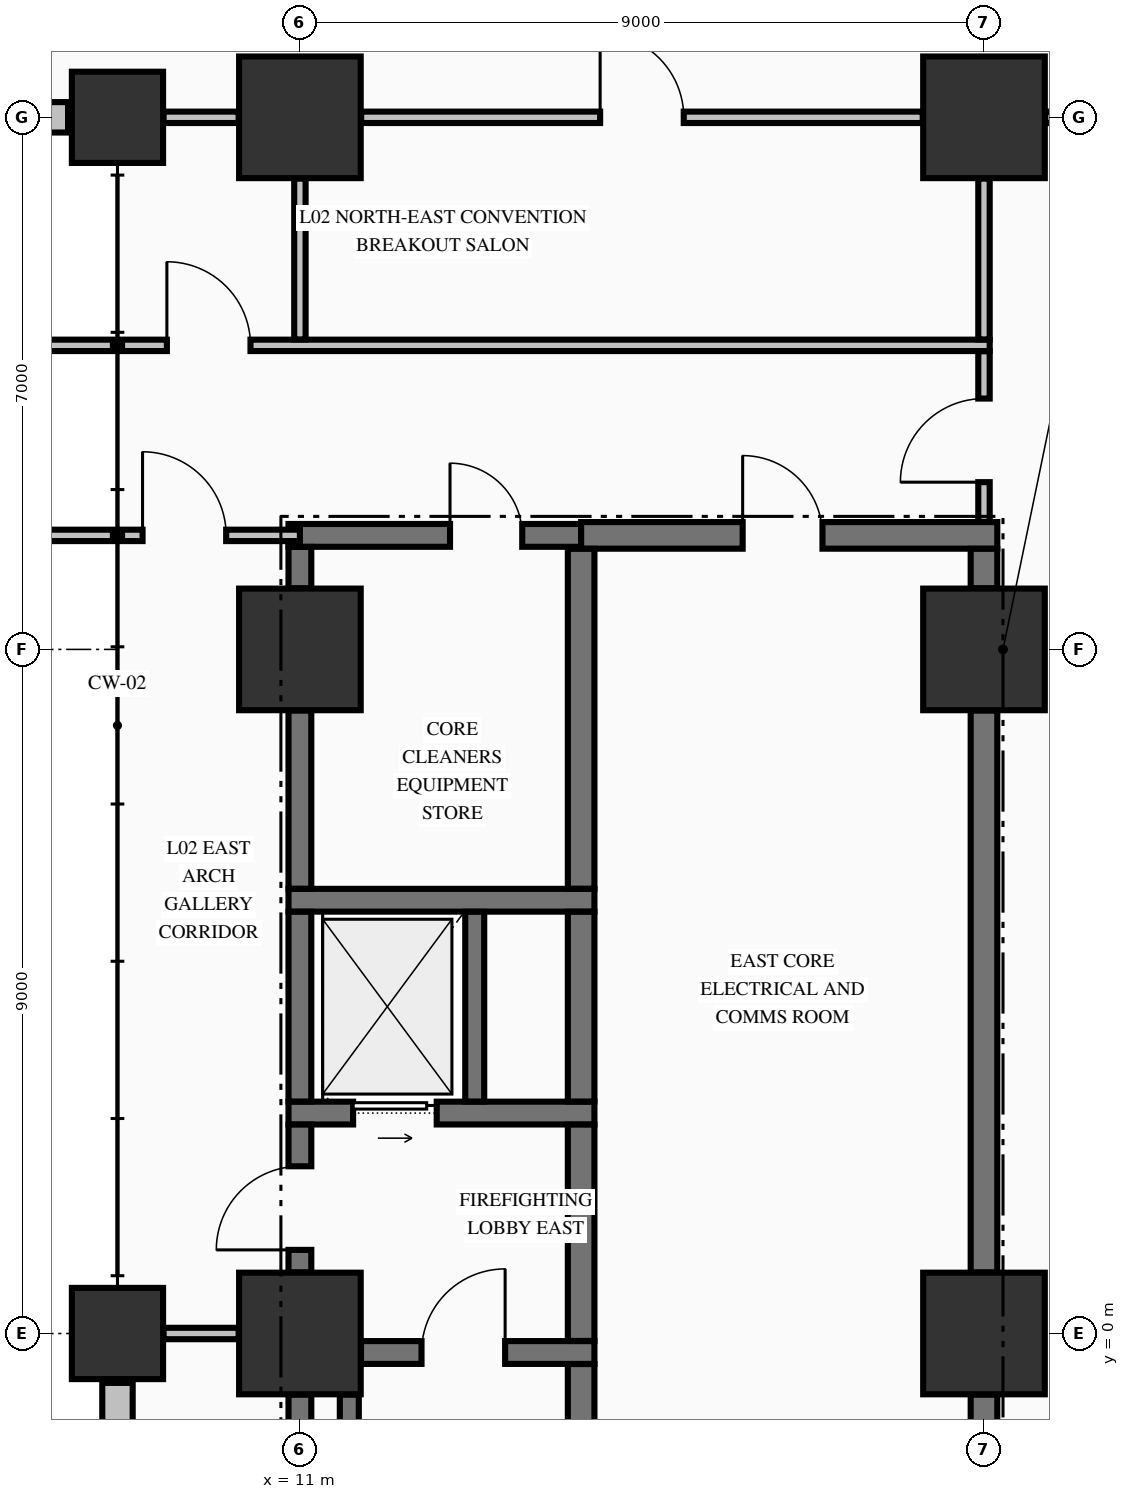
"""IFC4 building model, lengths in metres.
Left out: names, types, materials, properties, quantities, classifications, styles, units other than length and angle.
Written with IfcOpenShell. Run it as: python <this file> out.ifc"""

import sys

from ifc_helpers import new_model, si_unit, direction, frame, frame_2d, origin, origin_2d, place, context, subcontext, project, spatial, rectangle, extrude, element, fill, save


model = new_model("IFC4")
c1 = context("Model", 3, precision=1e-05, world=origin(), true_north=direction((0.0, 1.0)))
c2 = subcontext(c1, "Body", "Model", "MODEL_VIEW")
j1 = project(units=[si_unit("LENGTHUNIT", "METRE"), si_unit("PLANEANGLEUNIT", "RADIAN")], contexts=[c1])
p1 = place(None, origin())
s1 = spatial("IfcSite", under=j1, at=p1, CompositionType="ELEMENT")
p2 = place(p1, origin())
s2 = spatial("IfcBuilding", under=s1, at=p2, CompositionType="ELEMENT")
p3 = place(p2, frame((0.0, 0.0, 10.88)))
s3 = spatial("IfcBuildingStorey", under=s2, at=p3, CompositionType="ELEMENT", Elevation=10.88)
for number, where, z_axis, x_axis in (
    (1, (11.0, 0.0, 0.0), (0.0, 0.0, 1.0), (1.0, 0.0, 0.0)),
    (2, (11.0, 9.0, 0.0), (0.0, 0.0, 1.0), (1.0, 0.0, 0.0)),
    (3, (11.0, 16.0, 0.0), (0.0, 0.0, 1.0), (1.0, 0.0, 0.0)),
    (4, (20.0, 0.0, 0.0), (0.0, 0.0, 1.0), (1.0, 0.0, 0.0)),
    (5, (20.0, 9.0, 0.0), (0.0, 0.0, 1.0), (1.0, 0.0, 0.0)),
    (6, (20.0, 16.0, 0.0), (0.0, 0.0, 1.0), (1.0, 0.0, 0.0)),
):
    element("IfcColumn", number, at=place(p3, frame(where, z_axis=z_axis, x_axis=x_axis)), inside=s3, PredefinedType="COLUMN", context=c2, shape_type="SweptSolid", body=[
        extrude(rectangle(XDim=1.6, YDim=1.6, at=origin_2d()), origin(), (0.0, 0.0, 1.0), 5.09),
    ])
for number, where, z_axis, x_axis in (
    (7, (8.6, 0.0, 0.0), (0.0, 0.0, 1.0), (1.0, 0.0, 0.0)),
    (8, (8.6, 16.0, 0.0), (0.0, 0.0, 1.0), (1.0, 0.0, 0.0)),
):
    element("IfcColumn", number, at=place(p3, frame(where, z_axis=z_axis, x_axis=x_axis)), inside=s3, PredefinedType="COLUMN", context=c2, shape_type="SweptSolid", body=[
        extrude(rectangle(XDim=1.2, YDim=1.2, at=origin_2d()), origin(), (0.0, 0.0, 1.0), 5.09),
    ])
p4 = place(p3, frame((8.6, -0.65, 0.0), z_axis=(0.0, 0.0, 1.0), x_axis=(0.0, -1.0, 0.0)))
e9 = element("IfcWall", 9, at=p4, inside=s3, PredefinedType="STANDARD", context=c2, shape_type="SweptSolid", body=[
    extrude(rectangle(XDim=24.72, YDim=0.4, at=frame_2d((12.36, 0.0))), origin(), (0.0, 0.0, 1.0), 4.132),
])
p5 = place(p3, frame((0.73, 16.0, 0.0), z_axis=(0.0, 0.0, 1.0), x_axis=(1.0, 0.0, 0.0)))
e10 = element("IfcWall", 10, at=p5, inside=s3, PredefinedType="STANDARD", context=c2, shape_type="SweptSolid", body=[
    extrude(rectangle(XDim=7.22, YDim=0.4, at=frame_2d((3.61, 0.0))), origin(), (0.0, 0.0, 1.0), 4.132),
])
p6 = place(p3, frame((11.804, -0.25, 0.0), z_axis=(0.0, 0.0, 1.0), x_axis=(1.0, 0.0, 0.0)))
e11 = element("IfcWall", 11, at=p6, inside=s3, PredefinedType="SHEAR", context=c2, shape_type="SweptSolid", body=[
    extrude(rectangle(XDim=3.071, YDim=0.3, at=frame_2d((1.536, 0.0))), origin(), (0.0, 0.0, 1.0), 5.09),
])
p7 = place(p6, frame((0.796, 0.0, 0.0)))
e12 = element("IfcOpeningElement", 12, at=p7, cuts=e11, PredefinedType="OPENING", context=c2, shape_type="SweptSolid", body=[
    extrude(rectangle(XDim=1.1, YDim=2.15, at=frame_2d((0.55, 1.075))), frame((0.0, 0.16, 0.0), z_axis=(0.0, -1.0, 0.0), x_axis=(1.0, 0.0, 0.0)), (0.0, 0.0, 1.0), 0.32),
])
p8 = place(p3, frame((10.85, 2.9, 0.0), z_axis=(0.0, 0.0, 1.0), x_axis=(1.0, 0.0, 0.0)))
e13 = element("IfcWall", 13, at=p8, inside=s3, PredefinedType="SHEAR", context=c2, shape_type="SweptSolid", body=[
    extrude(rectangle(XDim=4.025, YDim=0.3, at=frame_2d((2.012, 0.0))), origin(), (0.0, 0.0, 1.0), 5.09),
])
p9 = place(p8, frame((0.85, 0.0, 0.0)))
e14 = element("IfcOpeningElement", 14, at=p9, cuts=e13, PredefinedType="OPENING", context=c2, shape_type="SweptSolid", body=[
    extrude(rectangle(XDim=1.1, YDim=2.2, at=frame_2d((0.55, 1.1))), frame((0.0, 0.16, 0.0), z_axis=(0.0, -1.0, 0.0), x_axis=(1.0, 0.0, 0.0)), (0.0, 0.0, 1.0), 0.32),
])
p10 = place(p3, frame((10.85, 5.7, 0.0), z_axis=(0.0, 0.0, 1.0), x_axis=(1.0, 0.0, 0.0)))
e15 = element("IfcWall", 15, at=p10, inside=s3, PredefinedType="SHEAR", context=c2, shape_type="SweptSolid", body=[
    extrude(rectangle(XDim=4.025, YDim=0.3, at=frame_2d((2.012, 0.0))), origin(), (0.0, 0.0, 1.0), 5.09),
])
p11 = place(p3, frame((10.85, 10.5, 0.0), z_axis=(0.0, 0.0, 1.0), x_axis=(1.0, 0.0, 0.0)))
e16 = element("IfcWall", 16, at=p11, inside=s3, PredefinedType="SHEAR", context=c2, shape_type="SweptSolid", body=[
    extrude(rectangle(XDim=3.85, YDim=0.3, at=frame_2d((1.925, 0.0))), origin(), (0.0, 0.0, 1.0), 5.09),
])
p12 = place(p11, frame((2.125, 0.0, 0.0)))
e17 = element("IfcOpeningElement", 17, at=p12, cuts=e16, PredefinedType="OPENING", context=c2, shape_type="SweptSolid", body=[
    extrude(rectangle(XDim=0.95, YDim=2.15, at=frame_2d((0.475, 1.075))), frame((0.0, 0.16, 0.0), z_axis=(0.0, -1.0, 0.0), x_axis=(1.0, 0.0, 0.0)), (0.0, 0.0, 1.0), 0.32),
])
p13 = place(p3, frame((14.7, 10.5, 0.0), z_axis=(0.0, 0.0, 1.0), x_axis=(1.0, 0.0, 0.0)))
e18 = element("IfcWall", 18, at=p13, inside=s3, PredefinedType="SHEAR", context=c2, shape_type="SweptSolid", body=[
    extrude(rectangle(XDim=5.475, YDim=0.35, at=frame_2d((2.738, 0.0))), origin(), (0.0, 0.0, 1.0), 5.09),
])
p14 = place(p13, frame((2.125, 0.0, 0.0)))
e19 = element("IfcOpeningElement", 19, at=p14, cuts=e18, PredefinedType="OPENING", context=c2, shape_type="SweptSolid", body=[
    extrude(rectangle(XDim=1.05, YDim=2.15, at=frame_2d((0.525, 1.075))), frame((0.0, 0.185, 0.0), z_axis=(0.0, -1.0, 0.0), x_axis=(1.0, 0.0, 0.0)), (0.0, 0.0, 1.0), 0.37),
])
p15 = place(p3, frame((9.206, 0.0, 0.0), z_axis=(0.0, 0.0, 1.0), x_axis=(1.0, 0.0, 0.0)))
e20 = element("IfcWall", 20, at=p15, inside=s3, PredefinedType="PARTITIONING", context=c2, shape_type="SweptSolid", body=[
    extrude(rectangle(XDim=0.988, YDim=0.15, at=frame_2d((0.494, 0.0))), origin(), (0.0, 0.0, 1.0), 4.132),
])
p16 = place(p3, frame((-8.54, 10.5, 0.0), z_axis=(0.0, 0.0, 1.0), x_axis=(1.0, 0.0, 0.0)))
e21 = element("IfcWall", 21, at=p16, inside=s3, PredefinedType="PARTITIONING", context=c2, shape_type="SweptSolid", body=[
    extrude(rectangle(XDim=17.08, YDim=0.15, at=frame_2d((8.54, 0.0))), origin(), (0.0, 0.0, 1.0), 5.09),
])
p17 = place(p3, frame((8.66, 10.5, 0.0), z_axis=(0.0, 0.0, 1.0), x_axis=(1.0, 0.0, 0.0)))
e22 = element("IfcWall", 22, at=p17, inside=s3, PredefinedType="PARTITIONING", context=c2, shape_type="SweptSolid", body=[
    extrude(rectangle(XDim=2.34, YDim=0.15, at=frame_2d((1.17, 0.0))), origin(), (0.0, 0.0, 1.0), 5.09),
])
p18 = place(p17, frame((0.27, 0.0, 0.0)))
e23 = element("IfcOpeningElement", 23, at=p18, cuts=e22, PredefinedType="OPENING", context=c2, shape_type="SweptSolid", body=[
    extrude(rectangle(XDim=1.1, YDim=2.15, at=frame_2d((0.55, 1.075))), frame((0.0, 0.085, 0.0), z_axis=(0.0, -1.0, 0.0), x_axis=(1.0, 0.0, 0.0)), (0.0, 0.0, 1.0), 0.17),
])
p19 = place(p3, frame((-8.54, 13.0, 0.0), z_axis=(0.0, 0.0, 1.0), x_axis=(1.0, 0.0, 0.0)))
e24 = element("IfcWall", 24, at=p19, inside=s3, PredefinedType="PARTITIONING", context=c2, shape_type="SweptSolid", body=[
    extrude(rectangle(XDim=17.08, YDim=0.15, at=frame_2d((8.54, 0.0))), origin(), (0.0, 0.0, 1.0), 5.09),
])
p20 = place(p3, frame((8.66, 13.0, 0.0), z_axis=(0.0, 0.0, 1.0), x_axis=(1.0, 0.0, 0.0)))
e25 = element("IfcWall", 25, at=p20, inside=s3, PredefinedType="PARTITIONING", context=c2, shape_type="SweptSolid", body=[
    extrude(rectangle(XDim=11.415, YDim=0.15, at=frame_2d((5.708, 0.0))), origin(), (0.0, 0.0, 1.0), 5.09),
])
p21 = place(p20, frame((0.59, 0.0, 0.0)))
e26 = element("IfcOpeningElement", 26, at=p21, cuts=e25, PredefinedType="OPENING", context=c2, shape_type="SweptSolid", body=[
    extrude(rectangle(XDim=1.1, YDim=2.15, at=frame_2d((0.55, 1.075))), frame((0.0, 0.085, 0.0), z_axis=(0.0, -1.0, 0.0), x_axis=(1.0, 0.0, 0.0)), (0.0, 0.0, 1.0), 0.17),
])
p22 = place(p3, frame((9.206, 16.0, 0.0), z_axis=(0.0, 0.0, 1.0), x_axis=(1.0, 0.0, 0.0)))
e27 = element("IfcWall", 27, at=p22, inside=s3, PredefinedType="PARTITIONING", context=c2, shape_type="SweptSolid", body=[
    extrude(rectangle(XDim=0.988, YDim=0.15, at=frame_2d((0.494, 0.0))), origin(), (0.0, 0.0, 1.0), 4.132),
])
p23 = place(p3, frame((11.806, 16.0, 0.0), z_axis=(0.0, 0.0, 1.0), x_axis=(1.0, 0.0, 0.0)))
e28 = element("IfcWall", 28, at=p23, inside=s3, PredefinedType="PARTITIONING", context=c2, shape_type="SweptSolid", body=[
    extrude(rectangle(XDim=7.388, YDim=0.15, at=frame_2d((3.694, 0.0))), origin(), (0.0, 0.0, 1.0), 4.132),
])
p24 = place(p23, frame((3.144, 0.0, 0.0)))
e29 = element("IfcOpeningElement", 29, at=p24, cuts=e28, PredefinedType="OPENING", context=c2, shape_type="SweptSolid", body=[
    extrude(rectangle(XDim=1.1, YDim=2.15, at=frame_2d((0.55, 1.075))), frame((0.0, 0.085, 0.0), z_axis=(0.0, -1.0, 0.0), x_axis=(1.0, 0.0, 0.0)), (0.0, 0.0, 1.0), 0.17),
])
p25 = place(p3, frame((20.806, 16.0, 0.0), z_axis=(0.0, 0.0, 1.0), x_axis=(1.0, 0.0, 0.0)))
e30 = element("IfcWall", 30, at=p25, inside=s3, PredefinedType="PARTITIONING", context=c2, shape_type="SweptSolid", body=[
    extrude(rectangle(XDim=4.488, YDim=0.15, at=frame_2d((2.244, 0.0))), origin(), (0.0, 0.0, 1.0), 4.132),
])
p26 = place(p25, frame((0.15, 0.0, 0.0)))
e31 = element("IfcOpeningElement", 31, at=p26, cuts=e30, PredefinedType="OPENING", context=c2, shape_type="SweptSolid", body=[
    extrude(rectangle(XDim=1.1, YDim=2.15, at=frame_2d((0.55, 1.075))), frame((0.0, 0.085, 0.0), z_axis=(0.0, -1.0, 0.0), x_axis=(1.0, 0.0, 0.0)), (0.0, 0.0, 1.0), 0.17),
])
p27 = place(p25, frame((2.844, 0.0, 0.0)))
e32 = element("IfcOpeningElement", 32, at=p27, cuts=e30, PredefinedType="OPENING", context=c2, shape_type="SweptSolid", body=[
    extrude(rectangle(XDim=1.1, YDim=2.15, at=frame_2d((0.55, 1.075))), frame((0.0, 0.085, 0.0), z_axis=(0.0, -1.0, 0.0), x_axis=(1.0, 0.0, 0.0)), (0.0, 0.0, 1.0), 0.17),
])
p28 = place(p3, frame((11.0, -8.196, 0.0), z_axis=(0.0, 0.0, 1.0), x_axis=(0.0, 1.0, 0.0)))
e33 = element("IfcWall", 33, at=p28, inside=s3, PredefinedType="SHEAR", context=c2, shape_type="SweptSolid", body=[
    extrude(rectangle(XDim=7.392, YDim=0.3, at=frame_2d((3.696, 0.0))), origin(), (0.0, 0.0, 1.0), 5.09),
])
p29 = place(p3, frame((11.0, 0.804, 0.0), z_axis=(0.0, 0.0, 1.0), x_axis=(0.0, 1.0, 0.0)))
e34 = element("IfcWall", 34, at=p29, inside=s3, PredefinedType="SHEAR", context=c2, shape_type="SweptSolid", body=[
    extrude(rectangle(XDim=1.944, YDim=0.3, at=frame_2d((0.972, 0.0))), origin(), (0.0, 0.0, 1.0), 5.09),
])
p30 = place(p29, frame((0.296, 0.0, 0.0)))
e35 = element("IfcOpeningElement", 35, at=p30, cuts=e34, PredefinedType="OPENING", context=c2, shape_type="SweptSolid", body=[
    extrude(rectangle(XDim=1.1, YDim=2.15, at=frame_2d((0.55, 1.075))), frame((0.0, 0.16, 0.0), z_axis=(0.0, -1.0, 0.0), x_axis=(1.0, 0.0, 0.0)), (0.0, 0.0, 1.0), 0.32),
])
p31 = place(p3, frame((11.0, 3.052, 0.0), z_axis=(0.0, 0.0, 1.0), x_axis=(0.0, 1.0, 0.0)))
e36 = element("IfcWall", 36, at=p31, inside=s3, PredefinedType="SHEAR", context=c2, shape_type="SweptSolid", body=[
    extrude(rectangle(XDim=2.496, YDim=0.3, at=frame_2d((1.248, 0.0))), origin(), (0.0, 0.0, 1.0), 5.09),
])
p32 = place(p3, frame((11.0, 5.852, 0.0), z_axis=(0.0, 0.0, 1.0), x_axis=(0.0, 1.0, 0.0)))
e37 = element("IfcWall", 37, at=p32, inside=s3, PredefinedType="SHEAR", context=c2, shape_type="SweptSolid", body=[
    extrude(rectangle(XDim=2.344, YDim=0.3, at=frame_2d((1.172, 0.0))), origin(), (0.0, 0.0, 1.0), 5.09),
])
p33 = place(p3, frame((11.0, 9.804, 0.0), z_axis=(0.0, 0.0, 1.0), x_axis=(0.0, 1.0, 0.0)))
e38 = element("IfcWall", 38, at=p33, inside=s3, PredefinedType="SHEAR", context=c2, shape_type="SweptSolid", body=[
    extrude(rectangle(XDim=0.544, YDim=0.3, at=frame_2d((0.272, 0.0))), origin(), (0.0, 0.0, 1.0), 5.09),
])
p34 = place(p3, frame((11.65, -8.196, 0.0), z_axis=(0.0, 0.0, 1.0), x_axis=(0.0, 1.0, 0.0)))
e39 = element("IfcWall", 39, at=p34, inside=s3, PredefinedType="SOLIDWALL", context=c2, shape_type="SweptSolid", body=[
    extrude(rectangle(XDim=7.392, YDim=0.25, at=frame_2d((3.696, 0.0))), origin(), (0.0, 0.0, 1.0), 5.09),
])
p35 = place(p3, frame((13.3, 3.052, 0.0), z_axis=(0.0, 0.0, 1.0), x_axis=(0.0, 1.0, 0.0)))
e40 = element("IfcWall", 40, at=p35, inside=s3, PredefinedType="SOLIDWALL", context=c2, shape_type="SweptSolid", body=[
    extrude(rectangle(XDim=2.496, YDim=0.25, at=frame_2d((1.248, 0.0))), origin(), (0.0, 0.0, 1.0), 5.09),
])
p36 = place(p3, frame((14.7, -9.773, 0.0), z_axis=(0.0, 0.0, 1.0), x_axis=(0.0, 1.0, 0.0)))
e41 = element("IfcWall", 41, at=p36, inside=s3, PredefinedType="SHEAR", context=c2, shape_type="SweptSolid", body=[
    extrude(rectangle(XDim=9.371, YDim=0.35, at=frame_2d((4.686, 0.0))), origin(), (0.0, 0.0, 1.0), 5.09),
])
p37 = place(p3, frame((14.7, -0.098, 0.0), z_axis=(0.0, 0.0, 1.0), x_axis=(0.0, 1.0, 0.0)))
e42 = element("IfcWall", 42, at=p37, inside=s3, PredefinedType="SHEAR", context=c2, shape_type="SweptSolid", body=[
    extrude(rectangle(XDim=2.846, YDim=0.35, at=frame_2d((1.423, 0.0))), origin(), (0.0, 0.0, 1.0), 5.09),
])
p38 = place(p3, frame((14.7, 3.052, 0.0), z_axis=(0.0, 0.0, 1.0), x_axis=(0.0, 1.0, 0.0)))
e43 = element("IfcWall", 43, at=p38, inside=s3, PredefinedType="SHEAR", context=c2, shape_type="SweptSolid", body=[
    extrude(rectangle(XDim=2.496, YDim=0.35, at=frame_2d((1.248, 0.0))), origin(), (0.0, 0.0, 1.0), 5.09),
])
p39 = place(p3, frame((14.7, 5.852, 0.0), z_axis=(0.0, 0.0, 1.0), x_axis=(0.0, 1.0, 0.0)))
e44 = element("IfcWall", 44, at=p39, inside=s3, PredefinedType="SHEAR", context=c2, shape_type="SweptSolid", body=[
    extrude(rectangle(XDim=4.471, YDim=0.35, at=frame_2d((2.235, 0.0))), origin(), (0.0, 0.0, 1.0), 5.09),
])
p40 = place(p3, frame((20.0, -4.423, 0.0), z_axis=(0.0, 0.0, 1.0), x_axis=(0.0, 1.0, 0.0)))
e45 = element("IfcWall", 45, at=p40, inside=s3, PredefinedType="SHEAR", context=c2, shape_type="SweptSolid", body=[
    extrude(rectangle(XDim=3.619, YDim=0.35, at=frame_2d((1.81, 0.0))), origin(), (0.0, 0.0, 1.0), 5.09),
])
p41 = place(p3, frame((20.0, 0.804, 0.0), z_axis=(0.0, 0.0, 1.0), x_axis=(0.0, 1.0, 0.0)))
e46 = element("IfcWall", 46, at=p41, inside=s3, PredefinedType="SHEAR", context=c2, shape_type="SweptSolid", body=[
    extrude(rectangle(XDim=7.392, YDim=0.35, at=frame_2d((3.696, 0.0))), origin(), (0.0, 0.0, 1.0), 5.09),
])
p42 = place(p3, frame((20.0, 9.804, 0.0), z_axis=(0.0, 0.0, 1.0), x_axis=(0.0, 1.0, 0.0)))
e47 = element("IfcWall", 47, at=p42, inside=s3, PredefinedType="SHEAR", context=c2, shape_type="SweptSolid", body=[
    extrude(rectangle(XDim=0.519, YDim=0.35, at=frame_2d((0.26, 0.0))), origin(), (0.0, 0.0, 1.0), 5.09),
])
p43 = place(p3, frame((11.0, 13.078, 0.0), z_axis=(0.0, 0.0, 1.0), x_axis=(0.0, 1.0, 0.0)))
e48 = element("IfcWall", 48, at=p43, inside=s3, PredefinedType="PARTITIONING", context=c2, shape_type="SweptSolid", body=[
    extrude(rectangle(XDim=2.116, YDim=0.15, at=frame_2d((1.058, 0.0))), origin(), (0.0, 0.0, 1.0), 4.132),
])
p44 = place(p3, frame((20.0, 10.678, 0.0), z_axis=(0.0, 0.0, 1.0), x_axis=(0.0, 1.0, 0.0)))
e49 = element("IfcWall", 49, at=p44, inside=s3, PredefinedType="PARTITIONING", context=c2, shape_type="SweptSolid", body=[
    extrude(rectangle(XDim=2.244, YDim=0.15, at=frame_2d((1.122, 0.0))), origin(), (0.0, 0.0, 1.0), 4.132),
])
p45 = place(p44, frame((0.522, 0.0, 0.0)))
e50 = element("IfcOpeningElement", 50, at=p45, cuts=e49, PredefinedType="OPENING", context=c2, shape_type="SweptSolid", body=[
    extrude(rectangle(XDim=1.1, YDim=2.15, at=frame_2d((0.55, 1.075))), frame((0.0, 0.085, 0.0), z_axis=(0.0, -1.0, 0.0), x_axis=(1.0, 0.0, 0.0)), (0.0, 0.0, 1.0), 0.17),
])
p46 = place(p3, frame((20.0, 13.078, 0.0), z_axis=(0.0, 0.0, 1.0), x_axis=(0.0, 1.0, 0.0)))
e51 = element("IfcWall", 51, at=p46, inside=s3, PredefinedType="PARTITIONING", context=c2, shape_type="SweptSolid", body=[
    extrude(rectangle(XDim=2.116, YDim=0.15, at=frame_2d((1.058, 0.0))), origin(), (0.0, 0.0, 1.0), 4.132),
])
p47 = place(p7, origin())
e52 = element("IfcDoor", 52, at=p47, inside=s3, OperationType="SINGLE_SWING_RIGHT", PredefinedType="DOOR", context=c2, shape_type="SweptSolid", body=[
    extrude(rectangle(XDim=1.1, YDim=2.15, at=frame_2d((0.55, 1.075))), frame((0.0, 0.025, 0.0), z_axis=(0.0, -1.0, 0.0), x_axis=(1.0, 0.0, 0.0)), (0.0, 0.0, 1.0), 0.05),
])
fill(e12, e52)
p48 = place(p30, origin())
e53 = element("IfcDoor", 53, at=p48, inside=s3, OperationType="SINGLE_SWING_LEFT", PredefinedType="DOOR", context=c2, shape_type="SweptSolid", body=[
    extrude(rectangle(XDim=1.1, YDim=2.15, at=frame_2d((0.55, 1.075))), frame((0.0, 0.025, 0.0), z_axis=(0.0, -1.0, 0.0), x_axis=(1.0, 0.0, 0.0)), (0.0, 0.0, 1.0), 0.05),
])
fill(e35, e53)
p49 = place(p9, origin())
e54 = element("IfcDoor", 54, at=p49, inside=s3, OperationType="SLIDING_TO_RIGHT", PredefinedType="DOOR", context=c2, shape_type="SweptSolid", body=[
    extrude(rectangle(XDim=1.1, YDim=2.2, at=frame_2d((0.55, 1.1))), frame((0.0, 0.025, 0.0), z_axis=(0.0, -1.0, 0.0), x_axis=(1.0, 0.0, 0.0)), (0.0, 0.0, 1.0), 0.05),
])
fill(e14, e54)
p50 = place(p12, origin())
e55 = element("IfcDoor", 55, at=p50, inside=s3, OperationType="SINGLE_SWING_LEFT", PredefinedType="DOOR", context=c2, shape_type="SweptSolid", body=[
    extrude(rectangle(XDim=0.95, YDim=2.15, at=frame_2d((0.475, 1.075))), frame((0.0, 0.025, 0.0), z_axis=(0.0, -1.0, 0.0), x_axis=(1.0, 0.0, 0.0)), (0.0, 0.0, 1.0), 0.05),
])
fill(e17, e55)
p51 = place(p14, origin())
e56 = element("IfcDoor", 56, at=p51, inside=s3, OperationType="SINGLE_SWING_LEFT", PredefinedType="DOOR", context=c2, shape_type="SweptSolid", body=[
    extrude(rectangle(XDim=1.05, YDim=2.15, at=frame_2d((0.525, 1.075))), frame((0.0, 0.025, 0.0), z_axis=(0.0, -1.0, 0.0), x_axis=(1.0, 0.0, 0.0)), (0.0, 0.0, 1.0), 0.05),
])
fill(e19, e56)
p52 = place(p24, origin())
e57 = element("IfcDoor", 57, at=p52, inside=s3, OperationType="SINGLE_SWING_LEFT", PredefinedType="DOOR", context=c2, shape_type="SweptSolid", body=[
    extrude(rectangle(XDim=1.1, YDim=2.15, at=frame_2d((0.55, 1.075))), frame((0.0, 0.025, 0.0), z_axis=(0.0, -1.0, 0.0), x_axis=(1.0, 0.0, 0.0)), (0.0, 0.0, 1.0), 0.05),
])
fill(e29, e57)
p53 = place(p21, origin())
e58 = element("IfcDoor", 58, at=p53, inside=s3, OperationType="SINGLE_SWING_LEFT", PredefinedType="DOOR", context=c2, shape_type="SweptSolid", body=[
    extrude(rectangle(XDim=1.1, YDim=2.15, at=frame_2d((0.55, 1.075))), frame((0.0, 0.025, 0.0), z_axis=(0.0, -1.0, 0.0), x_axis=(1.0, 0.0, 0.0)), (0.0, 0.0, 1.0), 0.05),
])
fill(e26, e58)
p54 = place(p18, origin())
e59 = element("IfcDoor", 59, at=p54, inside=s3, OperationType="SINGLE_SWING_LEFT", PredefinedType="DOOR", context=c2, shape_type="SweptSolid", body=[
    extrude(rectangle(XDim=1.1, YDim=2.15, at=frame_2d((0.55, 1.075))), frame((0.0, 0.025, 0.0), z_axis=(0.0, -1.0, 0.0), x_axis=(1.0, 0.0, 0.0)), (0.0, 0.0, 1.0), 0.05),
])
fill(e23, e59)
p55 = place(p45, origin())
e60 = element("IfcDoor", 60, at=p55, inside=s3, OperationType="SINGLE_SWING_LEFT", PredefinedType="DOOR", context=c2, shape_type="SweptSolid", body=[
    extrude(rectangle(XDim=1.1, YDim=2.15, at=frame_2d((0.55, 1.075))), frame((0.0, 0.025, 0.0), z_axis=(0.0, -1.0, 0.0), x_axis=(1.0, 0.0, 0.0)), (0.0, 0.0, 1.0), 0.05),
])
fill(e50, e60)
save(model, sys.argv[1])
